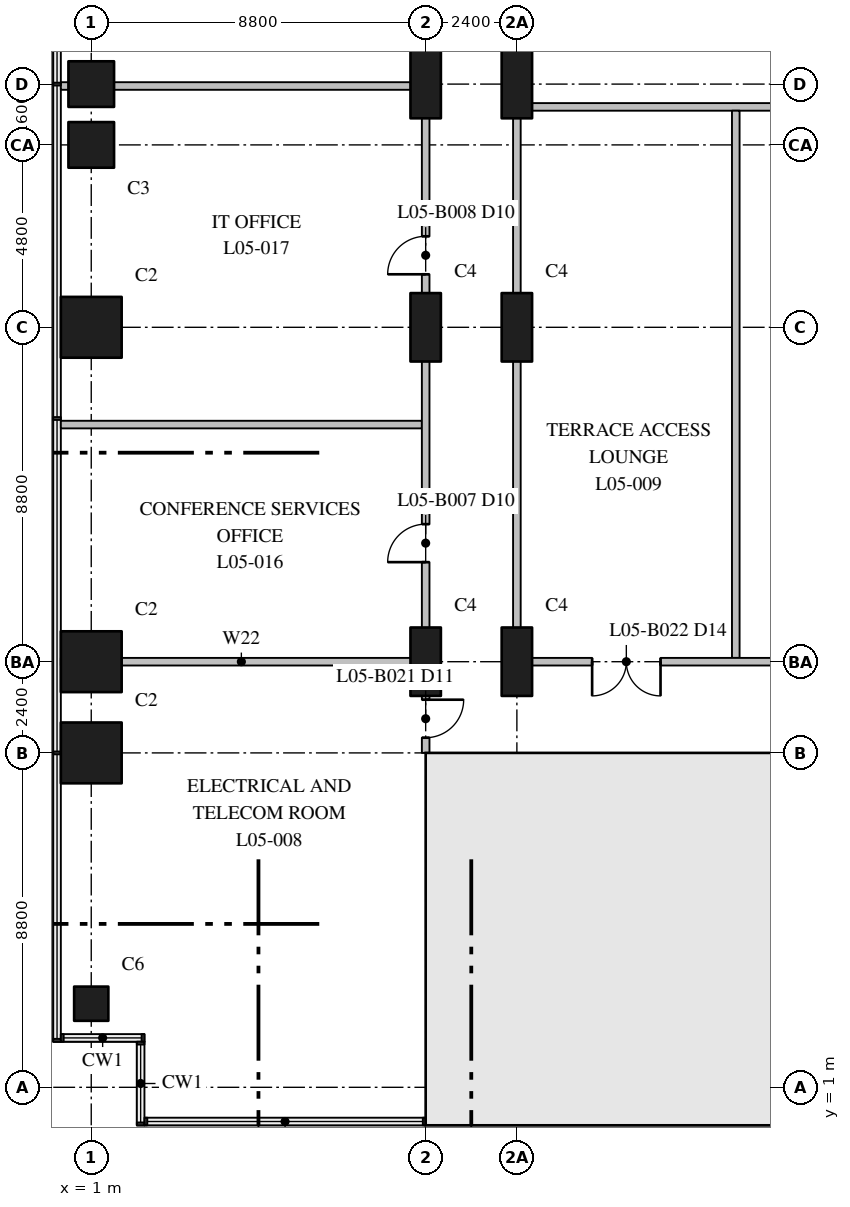
"""IFC4 building model, lengths in metres.
Left out: names, types, materials, properties, quantities, classifications, styles, units other than length and angle.
Written with IfcOpenShell. Run it as: python <this file> out.ifc"""

import sys

from ifc_helpers import new_model, si_unit, direction, frame, frame_2d, origin, origin_2d, place, context, subcontext, project, spatial, rectangle, extrude, element, fill, save


model = new_model("IFC4")
c1 = context("Model", 3, precision=1e-05, world=origin(), true_north=direction((0.0, 1.0)))
c2 = subcontext(c1, "Body", "Model", "MODEL_VIEW")
j1 = project(units=[si_unit("LENGTHUNIT", "METRE"), si_unit("PLANEANGLEUNIT", "RADIAN")], contexts=[c1])
p1 = place(None, origin())
s1 = spatial("IfcSite", under=j1, at=p1, CompositionType="ELEMENT")
p2 = place(p1, origin())
s2 = spatial("IfcBuilding", under=s1, at=p2, CompositionType="ELEMENT")
p3 = place(p2, frame((0.0, 0.0, 29.0)))
s3 = spatial("IfcBuildingStorey", under=s2, at=p3, CompositionType="ELEMENT", Elevation=29.0)
p4 = place(p3, frame((1.0, 3.2, 0.0), z_axis=(0.0, 0.0, 1.0), x_axis=(1.0, 0.0, 0.0)))
e1 = element("IfcColumn", 1, at=p4, inside=s3, PredefinedType="COLUMN", context=c2, shape_type="SweptSolid", body=[
    extrude(rectangle(XDim=0.9, YDim=0.9, at=origin_2d()), origin(), (0.0, 0.0, 1.0), 5.0),
])
for number, where, z_axis, x_axis in (
    (2, (1.0, 9.8, 0.0), (0.0, 0.0, 1.0), (1.0, 0.0, 0.0)),
    (3, (1.0, 12.2, 0.0), (0.0, 0.0, 1.0), (1.0, 0.0, 0.0)),
    (4, (1.0, 21.0, 0.0), (0.0, 0.0, 1.0), (1.0, 0.0, 0.0)),
):
    element("IfcColumn", number, at=place(p3, frame(where, z_axis=z_axis, x_axis=x_axis)), inside=s3, PredefinedType="COLUMN", context=c2, shape_type="SweptSolid", body=[
        extrude(rectangle(XDim=1.6, YDim=1.6, at=origin_2d()), origin(), (0.0, 0.0, 1.0), 5.0),
    ])
for number, where, z_axis, x_axis in (
    (5, (1.0, 25.8, 0.0), (0.0, 0.0, 1.0), (1.0, 0.0, 0.0)),
    (6, (1.0, 27.4, 0.0), (0.0, 0.0, 1.0), (1.0, 0.0, 0.0)),
):
    element("IfcColumn", number, at=place(p3, frame(where, z_axis=z_axis, x_axis=x_axis)), inside=s3, PredefinedType="COLUMN", context=c2, shape_type="SweptSolid", body=[
        extrude(rectangle(XDim=1.2, YDim=1.2, at=origin_2d()), origin(), (0.0, 0.0, 1.0), 5.0),
    ])
for number, where, z_axis, x_axis in (
    (7, (9.8, 12.2, 0.0), (0.0, 0.0, 1.0), (0.0, 1.0, 0.0)),
    (8, (9.8, 21.0, 0.0), (0.0, 0.0, 1.0), (0.0, 1.0, 0.0)),
    (9, (9.8, 27.4, 0.0), (0.0, 0.0, 1.0), (0.0, 1.0, 0.0)),
    (10, (12.2, 12.2, 0.0), (0.0, 0.0, 1.0), (0.0, 1.0, 0.0)),
    (11, (12.2, 21.0, 0.0), (0.0, 0.0, 1.0), (0.0, 1.0, 0.0)),
    (12, (12.2, 27.4, 0.0), (0.0, 0.0, 1.0), (0.0, 1.0, 0.0)),
):
    element("IfcColumn", number, at=place(p3, frame(where, z_axis=z_axis, x_axis=x_axis)), inside=s3, PredefinedType="COLUMN", context=c2, shape_type="SweptSolid", body=[
        extrude(rectangle(XDim=1.8, YDim=0.8, at=origin_2d()), origin(), (0.0, 0.0, 1.0), 5.0),
    ])
p5 = place(p3, frame((9.8, 0.6, 0.0), z_axis=(0.0, 0.0, 1.0), x_axis=(1.0, 0.0, 0.0)))
e13 = element("IfcWall", 13, at=p5, inside=s3, PredefinedType="SHEAR", context=c2, shape_type="SweptSolid", body=[
    extrude(rectangle(XDim=35.2, YDim=1.2, at=frame_2d((17.6, 0.0))), origin(), (0.0, 0.0, 1.0), 5.0),
])
p6 = place(p3, frame((10.4, 1.2, 0.0), z_axis=(0.0, 0.0, 1.0), x_axis=(0.0, 1.0, 0.0)))
e14 = element("IfcWall", 14, at=p6, inside=s3, PredefinedType="SHEAR", context=c2, shape_type="SweptSolid", body=[
    extrude(rectangle(XDim=8.6, YDim=1.2, at=frame_2d((4.3, 0.0))), origin(), (0.0, 0.0, 1.0), 5.0),
])
p7 = place(p3, frame((9.8, 9.6, 0.0), z_axis=(0.0, 0.0, 1.0), x_axis=(1.0, 0.0, 0.0)))
e15 = element("IfcWall", 15, at=p7, inside=s3, PredefinedType="SHEAR", context=c2, shape_type="SweptSolid", body=[
    extrude(rectangle(XDim=4.3, YDim=0.4, at=frame_2d((2.15, 0.0))), origin(), (0.0, 0.0, 1.0), 5.0),
])
p8 = place(p7, frame((2.05, 0.0, 0.0)))
e16 = element("IfcOpeningElement", 16, at=p8, cuts=e15, PredefinedType="OPENING", context=c2, shape_type="SweptSolid", body=[
    extrude(rectangle(XDim=1.2, YDim=2.1, at=frame_2d((0.6, 1.05))), frame((0.0, 0.21, 0.0), z_axis=(0.0, -1.0, 0.0), x_axis=(1.0, 0.0, 0.0)), (0.0, 0.0, 1.0), 0.42),
])
p9 = place(p3, frame((14.1, 9.6, 0.0), z_axis=(0.0, 0.0, 1.0), x_axis=(1.0, 0.0, 0.0)))
e17 = element("IfcWall", 17, at=p9, inside=s3, PredefinedType="SHEAR", context=c2, shape_type="SweptSolid", body=[
    extrude(rectangle(XDim=10.4, YDim=0.4, at=frame_2d((5.2, 0.0))), origin(), (0.0, 0.0, 1.0), 5.0),
])
p10 = place(p9, frame((0.8, 0.0, 0.0)))
e18 = element("IfcOpeningElement", 18, at=p10, cuts=e17, PredefinedType="OPENING", context=c2, shape_type="SweptSolid", body=[
    extrude(rectangle(XDim=1.0, YDim=2.1, at=frame_2d((0.5, 1.05))), frame((0.0, 0.21, 0.0), z_axis=(0.0, -1.0, 0.0), x_axis=(1.0, 0.0, 0.0)), (0.0, 0.0, 1.0), 0.42),
])
p11 = place(p9, frame((6.0, 0.0, 0.0)))
e19 = element("IfcOpeningElement", 19, at=p11, cuts=e17, PredefinedType="OPENING", context=c2, shape_type="SweptSolid", body=[
    extrude(rectangle(XDim=1.0, YDim=2.1, at=frame_2d((0.5, 1.05))), frame((0.0, 0.21, 0.0), z_axis=(0.0, -1.0, 0.0), x_axis=(1.0, 0.0, 0.0)), (0.0, 0.0, 1.0), 0.42),
])
p12 = place(p3, frame((14.1, 3.8, 0.0), z_axis=(0.0, 0.0, 1.0), x_axis=(1.0, 0.0, 0.0)))
e20 = element("IfcWall", 20, at=p12, inside=s3, PredefinedType="SHEAR", context=c2, shape_type="SweptSolid", body=[
    extrude(rectangle(XDim=26.6, YDim=0.4, at=frame_2d((13.3, 0.0))), origin(), (0.0, 0.0, 1.0), 5.0),
])
p13 = place(p12, frame((0.95, 0.0, 0.0)))
e21 = element("IfcOpeningElement", 21, at=p13, cuts=e20, PredefinedType="OPENING", context=c2, shape_type="SweptSolid", body=[
    extrude(rectangle(XDim=1.3, YDim=2.1, at=frame_2d((0.65, 1.05))), frame((0.0, 0.21, 0.0), z_axis=(0.0, -1.0, 0.0), x_axis=(1.0, 0.0, 0.0)), (0.0, 0.0, 1.0), 0.42),
])
p14 = place(p12, frame((3.95, 0.0, 0.0)))
e22 = element("IfcOpeningElement", 22, at=p14, cuts=e20, PredefinedType="OPENING", context=c2, shape_type="SweptSolid", body=[
    extrude(rectangle(XDim=1.1, YDim=2.1, at=frame_2d((0.55, 1.05))), frame((0.0, 0.21, 0.0), z_axis=(0.0, -1.0, 0.0), x_axis=(1.0, 0.0, 0.0)), (0.0, 0.0, 1.0), 0.42),
])
p15 = place(p12, frame((6.55, 0.0, 0.0)))
e23 = element("IfcOpeningElement", 23, at=p15, cuts=e20, PredefinedType="OPENING", context=c2, shape_type="SweptSolid", body=[
    extrude(rectangle(XDim=1.1, YDim=2.1, at=frame_2d((0.55, 1.05))), frame((0.0, 0.21, 0.0), z_axis=(0.0, -1.0, 0.0), x_axis=(1.0, 0.0, 0.0)), (0.0, 0.0, 1.0), 0.42),
])
p16 = place(p12, frame((9.15, 0.0, 0.0)))
e24 = element("IfcOpeningElement", 24, at=p16, cuts=e20, PredefinedType="OPENING", context=c2, shape_type="SweptSolid", body=[
    extrude(rectangle(XDim=1.1, YDim=2.1, at=frame_2d((0.55, 1.05))), frame((0.0, 0.21, 0.0), z_axis=(0.0, -1.0, 0.0), x_axis=(1.0, 0.0, 0.0)), (0.0, 0.0, 1.0), 0.42),
])
p17 = place(p12, frame((11.75, 0.0, 0.0)))
e25 = element("IfcOpeningElement", 25, at=p17, cuts=e20, PredefinedType="OPENING", context=c2, shape_type="SweptSolid", body=[
    extrude(rectangle(XDim=1.1, YDim=2.1, at=frame_2d((0.55, 1.05))), frame((0.0, 0.21, 0.0), z_axis=(0.0, -1.0, 0.0), x_axis=(1.0, 0.0, 0.0)), (0.0, 0.0, 1.0), 0.42),
])
p18 = place(p12, frame((14.35, 0.0, 0.0)))
e26 = element("IfcOpeningElement", 26, at=p18, cuts=e20, PredefinedType="OPENING", context=c2, shape_type="SweptSolid", body=[
    extrude(rectangle(XDim=1.1, YDim=2.1, at=frame_2d((0.55, 1.05))), frame((0.0, 0.21, 0.0), z_axis=(0.0, -1.0, 0.0), x_axis=(1.0, 0.0, 0.0)), (0.0, 0.0, 1.0), 0.42),
])
p19 = place(p12, frame((16.95, 0.0, 0.0)))
e27 = element("IfcOpeningElement", 27, at=p19, cuts=e20, PredefinedType="OPENING", context=c2, shape_type="SweptSolid", body=[
    extrude(rectangle(XDim=1.1, YDim=2.1, at=frame_2d((0.55, 1.05))), frame((0.0, 0.21, 0.0), z_axis=(0.0, -1.0, 0.0), x_axis=(1.0, 0.0, 0.0)), (0.0, 0.0, 1.0), 0.42),
])
p20 = place(p12, frame((19.55, 0.0, 0.0)))
e28 = element("IfcOpeningElement", 28, at=p20, cuts=e20, PredefinedType="OPENING", context=c2, shape_type="SweptSolid", body=[
    extrude(rectangle(XDim=1.1, YDim=2.1, at=frame_2d((0.55, 1.05))), frame((0.0, 0.21, 0.0), z_axis=(0.0, -1.0, 0.0), x_axis=(1.0, 0.0, 0.0)), (0.0, 0.0, 1.0), 0.42),
])
p21 = place(p3, frame((14.1, 6.8, 0.0), z_axis=(0.0, 0.0, 1.0), x_axis=(1.0, 0.0, 0.0)))
e29 = element("IfcWall", 29, at=p21, inside=s3, PredefinedType="SHEAR", context=c2, shape_type="SweptSolid", body=[
    extrude(rectangle(XDim=26.6, YDim=0.4, at=frame_2d((13.3, 0.0))), origin(), (0.0, 0.0, 1.0), 5.0),
])
p22 = place(p21, frame((10.8, 0.0, 0.0)))
e30 = element("IfcOpeningElement", 30, at=p22, cuts=e29, PredefinedType="OPENING", context=c2, shape_type="SweptSolid", body=[
    extrude(rectangle(XDim=1.8, YDim=2.1, at=frame_2d((0.9, 1.05))), frame((0.0, 0.21, 0.0), z_axis=(0.0, -1.0, 0.0), x_axis=(1.0, 0.0, 0.0)), (0.0, 0.0, 1.0), 0.42),
])
p23 = place(p21, frame((24.35, 0.0, 0.0)))
e31 = element("IfcOpeningElement", 31, at=p23, cuts=e29, PredefinedType="OPENING", context=c2, shape_type="SweptSolid", body=[
    extrude(rectangle(XDim=1.3, YDim=2.1, at=frame_2d((0.65, 1.05))), frame((0.0, 0.21, 0.0), z_axis=(0.0, -1.0, 0.0), x_axis=(1.0, 0.0, 0.0)), (0.0, 0.0, 1.0), 0.42),
])
p24 = place(p3, frame((14.1, 1.2, 0.0), z_axis=(0.0, 0.0, 1.0), x_axis=(0.0, 1.0, 0.0)))
e32 = element("IfcWall", 32, at=p24, inside=s3, PredefinedType="SHEAR", context=c2, shape_type="SweptSolid", body=[
    extrude(rectangle(XDim=8.4, YDim=0.4, at=frame_2d((4.2, 0.0))), origin(), (0.0, 0.0, 1.0), 5.0),
])
p25 = place(p24, frame((4.45, 0.0, 0.0)))
e33 = element("IfcOpeningElement", 33, at=p25, cuts=e32, PredefinedType="OPENING", context=c2, shape_type="SweptSolid", body=[
    extrude(rectangle(XDim=0.9, YDim=2.1, at=frame_2d((0.45, 1.05))), frame((0.0, 0.21, 0.0), z_axis=(0.0, -1.0, 0.0), x_axis=(1.0, 0.0, 0.0)), (0.0, 0.0, 1.0), 0.42),
])
p26 = place(p3, frame((17.3, 1.2, 0.0), z_axis=(0.0, 0.0, 1.0), x_axis=(0.0, 1.0, 0.0)))
e34 = element("IfcWall", 34, at=p26, inside=s3, PredefinedType="SHEAR", context=c2, shape_type="SweptSolid", body=[
    extrude(rectangle(XDim=2.4, YDim=0.25, at=frame_2d((1.2, 0.0))), origin(), (0.0, 0.0, 1.0), 5.0),
])
p27 = place(p3, frame((0.2, 12.2, 0.0), z_axis=(0.0, 0.0, 1.0), x_axis=(1.0, 0.0, 0.0)))
e35 = element("IfcWall", 35, at=p27, inside=s3, PredefinedType="PARTITIONING", context=c2, shape_type="SweptSolid", body=[
    extrude(rectangle(XDim=9.5, YDim=0.2, at=frame_2d((4.75, 0.0))), origin(), (0.0, 0.0, 1.0), 4.55),
])
p28 = place(p3, frame((12.1, 12.2, 0.0), z_axis=(0.0, 0.0, 1.0), x_axis=(1.0, 0.0, 0.0)))
e36 = element("IfcWall", 36, at=p28, inside=s3, PredefinedType="PARTITIONING", context=c2, shape_type="SweptSolid", body=[
    extrude(rectangle(XDim=18.9, YDim=0.2, at=frame_2d((9.45, 0.0))), origin(), (0.0, 0.0, 1.0), 4.55),
])
p29 = place(p28, frame((2.08, 0.0, 0.0)))
e37 = element("IfcOpeningElement", 37, at=p29, cuts=e36, PredefinedType="OPENING", context=c2, shape_type="SweptSolid", body=[
    extrude(rectangle(XDim=1.8, YDim=2.4, at=frame_2d((0.9, 1.2))), frame((0.0, 0.11, 0.0), z_axis=(0.0, -1.0, 0.0), x_axis=(1.0, 0.0, 0.0)), (0.0, 0.0, 1.0), 0.22),
])
p30 = place(p28, frame((9.88, 0.0, 0.0)))
e38 = element("IfcOpeningElement", 38, at=p30, cuts=e36, PredefinedType="OPENING", context=c2, shape_type="SweptSolid", body=[
    extrude(rectangle(XDim=1.8, YDim=2.1, at=frame_2d((0.9, 1.05))), frame((0.0, 0.11, 0.0), z_axis=(0.0, -1.0, 0.0), x_axis=(1.0, 0.0, 0.0)), (0.0, 0.0, 1.0), 0.22),
])
p31 = place(p3, frame((12.1, 26.8, 0.0), z_axis=(0.0, 0.0, 1.0), x_axis=(1.0, 0.0, 0.0)))
e39 = element("IfcWall", 39, at=p31, inside=s3, PredefinedType="PARTITIONING", context=c2, shape_type="SweptSolid", body=[
    extrude(rectangle(XDim=13.7, YDim=0.2, at=frame_2d((6.85, 0.0))), origin(), (0.0, 0.0, 1.0), 4.55),
])
for number, where, z_axis, x_axis in (
    (40, (0.2, 18.44, 0.0), (0.0, 0.0, 1.0), (1.0, 0.0, 0.0)),
    (41, (0.2, 27.35, 0.0), (0.0, 0.0, 1.0), (1.0, 0.0, 0.0)),
):
    element("IfcWall", number, at=place(p3, frame(where, z_axis=z_axis, x_axis=x_axis)), inside=s3, PredefinedType="PARTITIONING", context=c2, shape_type="SweptSolid", body=[
        extrude(rectangle(XDim=9.5, YDim=0.2, at=frame_2d((4.75, 0.0))), origin(), (0.0, 0.0, 1.0), 4.55),
    ])
p32 = place(p3, frame((9.8, 9.8, 0.0), z_axis=(0.0, 0.0, 1.0), x_axis=(0.0, 1.0, 0.0)))
e42 = element("IfcWall", 42, at=p32, inside=s3, PredefinedType="PARTITIONING", context=c2, shape_type="SweptSolid", body=[
    extrude(rectangle(XDim=48.0, YDim=0.2, at=frame_2d((24.0, 0.0))), origin(), (0.0, 0.0, 1.0), 4.55),
])
p33 = place(p32, frame((5.02, 0.0, 0.0)))
e43 = element("IfcOpeningElement", 43, at=p33, cuts=e42, PredefinedType="OPENING", context=c2, shape_type="SweptSolid", body=[
    extrude(rectangle(XDim=1.0, YDim=2.1, at=frame_2d((0.5, 1.05))), frame((0.0, 0.11, 0.0), z_axis=(0.0, -1.0, 0.0), x_axis=(1.0, 0.0, 0.0)), (0.0, 0.0, 1.0), 0.22),
])
p34 = place(p32, frame((12.595, 0.0, 0.0)))
e44 = element("IfcOpeningElement", 44, at=p34, cuts=e42, PredefinedType="OPENING", context=c2, shape_type="SweptSolid", body=[
    extrude(rectangle(XDim=1.0, YDim=2.1, at=frame_2d((0.5, 1.05))), frame((0.0, 0.11, 0.0), z_axis=(0.0, -1.0, 0.0), x_axis=(1.0, 0.0, 0.0)), (0.0, 0.0, 1.0), 0.22),
])
p35 = place(p32, frame((22.845, 0.0, 0.0)))
e45 = element("IfcOpeningElement", 45, at=p35, cuts=e42, PredefinedType="OPENING", context=c2, shape_type="SweptSolid", body=[
    extrude(rectangle(XDim=1.0, YDim=2.1, at=frame_2d((0.5, 1.05))), frame((0.0, 0.11, 0.0), z_axis=(0.0, -1.0, 0.0), x_axis=(1.0, 0.0, 0.0)), (0.0, 0.0, 1.0), 0.22),
])
p36 = place(p32, frame((31.8, 0.0, 0.0)))
e46 = element("IfcOpeningElement", 46, at=p36, cuts=e42, PredefinedType="OPENING", context=c2, shape_type="SweptSolid", body=[
    extrude(rectangle(XDim=1.0, YDim=2.1, at=frame_2d((0.5, 1.05))), frame((0.0, 0.11, 0.0), z_axis=(0.0, -1.0, 0.0), x_axis=(1.0, 0.0, 0.0)), (0.0, 0.0, 1.0), 0.22),
])
p37 = place(p32, frame((39.23, 0.0, 0.0)))
e47 = element("IfcOpeningElement", 47, at=p37, cuts=e42, PredefinedType="OPENING", context=c2, shape_type="SweptSolid", body=[
    extrude(rectangle(XDim=1.0, YDim=2.1, at=frame_2d((0.5, 1.05))), frame((0.0, 0.11, 0.0), z_axis=(0.0, -1.0, 0.0), x_axis=(1.0, 0.0, 0.0)), (0.0, 0.0, 1.0), 0.22),
])
p38 = place(p32, frame((44.967, 0.0, 0.0)))
e48 = element("IfcOpeningElement", 48, at=p38, cuts=e42, PredefinedType="OPENING", context=c2, shape_type="SweptSolid", body=[
    extrude(rectangle(XDim=1.0, YDim=2.1, at=frame_2d((0.5, 1.05))), frame((0.0, 0.11, 0.0), z_axis=(0.0, -1.0, 0.0), x_axis=(1.0, 0.0, 0.0)), (0.0, 0.0, 1.0), 0.22),
])
p39 = place(p32, frame((0.4, 0.0, 0.0)))
e49 = element("IfcOpeningElement", 49, at=p39, cuts=e42, PredefinedType="OPENING", context=c2, shape_type="SweptSolid", body=[
    extrude(rectangle(XDim=1.0, YDim=2.1, at=frame_2d((0.5, 1.05))), frame((0.0, 0.11, 0.0), z_axis=(0.0, -1.0, 0.0), x_axis=(1.0, 0.0, 0.0)), (0.0, 0.0, 1.0), 0.22),
])
for number, where, z_axis, x_axis in (
    (50, (12.2, 12.3, 0.0), (0.0, 0.0, 1.0), (0.0, 1.0, 0.0)),
    (51, (17.96, 12.3, 0.0), (0.0, 0.0, 1.0), (0.0, 1.0, 0.0)),
):
    element("IfcWall", number, at=place(p3, frame(where, z_axis=z_axis, x_axis=x_axis)), inside=s3, PredefinedType="PARTITIONING", context=c2, shape_type="SweptSolid", body=[
        extrude(rectangle(XDim=14.4, YDim=0.2, at=frame_2d((7.2, 0.0))), origin(), (0.0, 0.0, 1.0), 4.55),
    ])
p40 = place(p13, origin())
e52 = element("IfcDoor", 52, at=p40, inside=s3, OperationType="DOUBLE_DOOR_SLIDING", PredefinedType="DOOR", context=c2, shape_type="SweptSolid", body=[
    extrude(rectangle(XDim=1.3, YDim=2.1, at=frame_2d((0.65, 1.05))), frame((0.0, 0.025, 0.0), z_axis=(0.0, -1.0, 0.0), x_axis=(1.0, 0.0, 0.0)), (0.0, 0.0, 1.0), 0.05),
])
fill(e21, e52)
p41 = place(p14, origin())
e53 = element("IfcDoor", 53, at=p41, inside=s3, OperationType="DOUBLE_DOOR_SLIDING", PredefinedType="DOOR", context=c2, shape_type="SweptSolid", body=[
    extrude(rectangle(XDim=1.1, YDim=2.1, at=frame_2d((0.55, 1.05))), frame((0.0, 0.025, 0.0), z_axis=(0.0, -1.0, 0.0), x_axis=(1.0, 0.0, 0.0)), (0.0, 0.0, 1.0), 0.05),
])
fill(e22, e53)
p42 = place(p10, frame((1.0, 0.0, 0.0), z_axis=(0.0, 0.0, 1.0), x_axis=(-1.0, 0.0, 0.0)))
e54 = element("IfcDoor", 54, at=p42, inside=s3, OperationType="SINGLE_SWING_RIGHT", PredefinedType="DOOR", context=c2, shape_type="SweptSolid", body=[
    extrude(rectangle(XDim=1.0, YDim=2.1, at=frame_2d((0.5, 1.05))), frame((0.0, 0.025, 0.0), z_axis=(0.0, -1.0, 0.0), x_axis=(1.0, 0.0, 0.0)), (0.0, 0.0, 1.0), 0.05),
])
fill(e18, e54)
p43 = place(p8, frame((1.2, 0.0, 0.0), z_axis=(0.0, 0.0, 1.0), x_axis=(-1.0, 0.0, 0.0)))
e55 = element("IfcDoor", 55, at=p43, inside=s3, OperationType="SINGLE_SWING_LEFT", PredefinedType="DOOR", context=c2, shape_type="SweptSolid", body=[
    extrude(rectangle(XDim=1.2, YDim=2.1, at=frame_2d((0.6, 1.05))), frame((0.0, 0.025, 0.0), z_axis=(0.0, -1.0, 0.0), x_axis=(1.0, 0.0, 0.0)), (0.0, 0.0, 1.0), 0.05),
])
fill(e16, e55)
p44 = place(p25, origin())
e56 = element("IfcDoor", 56, at=p44, inside=s3, OperationType="SINGLE_SWING_RIGHT", PredefinedType="DOOR", context=c2, shape_type="SweptSolid", body=[
    extrude(rectangle(XDim=0.9, YDim=2.1, at=frame_2d((0.45, 1.05))), frame((0.0, 0.025, 0.0), z_axis=(0.0, -1.0, 0.0), x_axis=(1.0, 0.0, 0.0)), (0.0, 0.0, 1.0), 0.05),
])
fill(e33, e56)
p45 = place(p33, origin())
e57 = element("IfcDoor", 57, at=p45, inside=s3, OperationType="SINGLE_SWING_LEFT", PredefinedType="DOOR", context=c2, shape_type="SweptSolid", body=[
    extrude(rectangle(XDim=1.0, YDim=2.1, at=frame_2d((0.5, 1.05))), frame((0.0, 0.025, 0.0), z_axis=(0.0, -1.0, 0.0), x_axis=(1.0, 0.0, 0.0)), (0.0, 0.0, 1.0), 0.05),
])
fill(e43, e57)
p46 = place(p34, origin())
e58 = element("IfcDoor", 58, at=p46, inside=s3, OperationType="SINGLE_SWING_LEFT", PredefinedType="DOOR", context=c2, shape_type="SweptSolid", body=[
    extrude(rectangle(XDim=1.0, YDim=2.1, at=frame_2d((0.5, 1.05))), frame((0.0, 0.025, 0.0), z_axis=(0.0, -1.0, 0.0), x_axis=(1.0, 0.0, 0.0)), (0.0, 0.0, 1.0), 0.05),
])
fill(e44, e58)
p47 = place(p39, frame((1.0, 0.0, 0.0), z_axis=(0.0, 0.0, 1.0), x_axis=(-1.0, 0.0, 0.0)))
e59 = element("IfcDoor", 59, at=p47, inside=s3, OperationType="SINGLE_SWING_RIGHT", PredefinedType="DOOR", context=c2, shape_type="SweptSolid", body=[
    extrude(rectangle(XDim=1.0, YDim=2.1, at=frame_2d((0.5, 1.05))), frame((0.0, 0.025, 0.0), z_axis=(0.0, -1.0, 0.0), x_axis=(1.0, 0.0, 0.0)), (0.0, 0.0, 1.0), 0.05),
])
fill(e49, e59)
p48 = place(p29, frame((1.8, 0.0, 0.0), z_axis=(0.0, 0.0, 1.0), x_axis=(-1.0, 0.0, 0.0)))
e60 = element("IfcDoor", 60, at=p48, inside=s3, OperationType="DOUBLE_DOOR_SINGLE_SWING", PredefinedType="DOOR", context=c2, shape_type="SweptSolid", body=[
    extrude(rectangle(XDim=1.8, YDim=2.4, at=frame_2d((0.9, 1.2))), frame((0.0, 0.025, 0.0), z_axis=(0.0, -1.0, 0.0), x_axis=(1.0, 0.0, 0.0)), (0.0, 0.0, 1.0), 0.05),
])
fill(e37, e60)
save(model, sys.argv[1])
